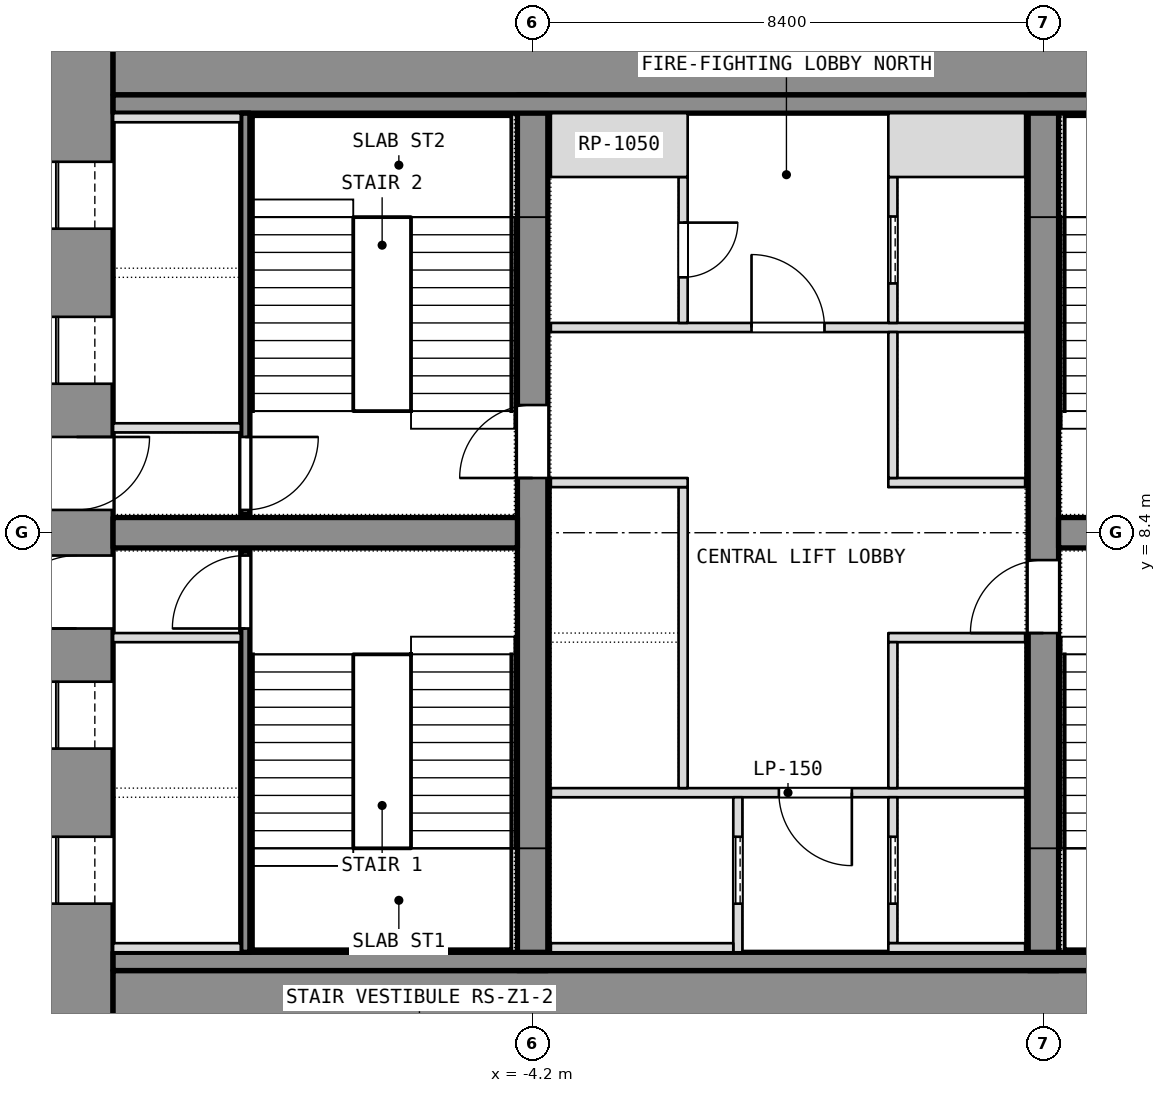
"""IFC4 building model, lengths in metres.
Left out: names, types, materials, properties, quantities, classifications, styles, units other than length and angle.
Written with IfcOpenShell. Run it as: python <this file> out.ifc"""

import sys

from ifc_helpers import new_model, si_unit, direction, frame, frame_2d, origin, place, context, subcontext, project, spatial, rectangle, extrude, element, fill, save


model = new_model("IFC4")
c1 = context("Model", 3, precision=1e-05, world=origin(), true_north=direction((0.0, 1.0)))
c2 = subcontext(c1, "Body", "Model", "MODEL_VIEW")
j1 = project(units=[si_unit("LENGTHUNIT", "METRE"), si_unit("PLANEANGLEUNIT", "RADIAN")], contexts=[c1])
p1 = place(None, origin())
s1 = spatial("IfcSite", under=j1, at=p1, CompositionType="ELEMENT")
p2 = place(p1, origin())
s2 = spatial("IfcBuilding", under=s1, at=p2, CompositionType="ELEMENT")
p3 = place(p2, frame((0.0, 0.0, 72.5)))
s3 = spatial("IfcBuildingStorey", under=s2, at=p3, CompositionType="ELEMENT", Elevation=72.5)
p4 = place(p3, frame((-11.7, 0.0, 0.0), z_axis=(0.0, 0.0, 1.0), x_axis=(0.0, 1.0, 0.0)))
e1 = element("IfcWall", 1, at=p4, inside=s3, PredefinedType="SHEAR", context=c2, shape_type="SweptSolid", body=[
    extrude(rectangle(XDim=16.8, YDim=1.2, at=frame_2d((8.4, 0.0))), origin(), (0.0, 0.0, 1.0), 3.6),
])
p5 = place(p4, frame((2.3, 0.0, 0.0)))
e2 = element("IfcOpeningElement", 2, at=p5, cuts=e1, PredefinedType="OPENING", context=c2, shape_type="SweptSolid", body=[
    extrude(rectangle(XDim=1.1, YDim=2.1, at=frame_2d((0.55, 1.05))), frame((0.0, 0.6, 0.0), z_axis=(0.0, -1.0, 0.0), x_axis=(1.0, 0.0, 0.0)), (0.0, 0.0, 1.0), 1.2),
])
p6 = place(p4, frame((4.85, 0.0, 0.0)))
e3 = element("IfcOpeningElement", 3, at=p6, cuts=e1, PredefinedType="OPENING", context=c2, shape_type="SweptSolid", body=[
    extrude(rectangle(XDim=1.1, YDim=2.1, at=frame_2d((0.55, 1.05))), frame((0.0, 0.6, 0.0), z_axis=(0.0, -1.0, 0.0), x_axis=(1.0, 0.0, 0.0)), (0.0, 0.0, 1.0), 1.2),
])
p7 = place(p4, frame((6.825, 0.0, 0.0)))
e4 = element("IfcOpeningElement", 4, at=p7, cuts=e1, PredefinedType="OPENING", context=c2, shape_type="SweptSolid", body=[
    extrude(rectangle(XDim=1.2, YDim=2.1, at=frame_2d((0.6, 1.05))), frame((0.0, 0.6, 0.0), z_axis=(0.0, -1.0, 0.0), x_axis=(1.0, 0.0, 0.0)), (0.0, 0.0, 1.0), 1.2),
])
p8 = place(p4, frame((13.4, 0.0, 0.0)))
e5 = element("IfcOpeningElement", 5, at=p8, cuts=e1, PredefinedType="OPENING", context=c2, shape_type="SweptSolid", body=[
    extrude(rectangle(XDim=1.1, YDim=2.1, at=frame_2d((0.55, 1.05))), frame((0.0, 0.6, 0.0), z_axis=(0.0, -1.0, 0.0), x_axis=(1.0, 0.0, 0.0)), (0.0, 0.0, 1.0), 1.2),
])
p9 = place(p4, frame((10.85, 0.0, 0.0)))
e6 = element("IfcOpeningElement", 6, at=p9, cuts=e1, PredefinedType="OPENING", context=c2, shape_type="SweptSolid", body=[
    extrude(rectangle(XDim=1.1, YDim=2.1, at=frame_2d((0.55, 1.05))), frame((0.0, 0.6, 0.0), z_axis=(0.0, -1.0, 0.0), x_axis=(1.0, 0.0, 0.0)), (0.0, 0.0, 1.0), 1.2),
])
p10 = place(p4, frame((8.775, 0.0, 0.0)))
e7 = element("IfcOpeningElement", 7, at=p10, cuts=e1, PredefinedType="OPENING", context=c2, shape_type="SweptSolid", body=[
    extrude(rectangle(XDim=1.2, YDim=2.1, at=frame_2d((0.6, 1.05))), frame((0.0, 0.6, 0.0), z_axis=(0.0, -1.0, 0.0), x_axis=(1.0, 0.0, 0.0)), (0.0, 0.0, 1.0), 1.2),
])
for number, where, z_axis, x_axis in (
    (8, (-11.1, 0.6, 0.0), (0.0, 0.0, 1.0), (1.0, 0.0, 0.0)),
    (9, (-11.1, 16.2, 0.0), (0.0, 0.0, 1.0), (1.0, 0.0, 0.0)),
):
    element("IfcWall", number, at=place(p3, frame(where, z_axis=z_axis, x_axis=x_axis)), inside=s3, PredefinedType="SHEAR", context=c2, shape_type="SweptSolid", body=[
        extrude(rectangle(XDim=22.2, YDim=1.2, at=frame_2d((11.1, 0.0))), origin(), (0.0, 0.0, 1.0), 3.6),
    ])
p11 = place(p3, frame((-4.2, 1.2, 0.0), z_axis=(0.0, 0.0, 1.0), x_axis=(0.0, 1.0, 0.0)))
e10 = element("IfcWall", 10, at=p11, inside=s3, PredefinedType="SHEAR", context=c2, shape_type="SweptSolid", body=[
    extrude(rectangle(XDim=14.4, YDim=0.5, at=frame_2d((7.2, 0.0))), origin(), (0.0, 0.0, 1.0), 3.6),
])
p12 = place(p11, frame((8.1, 0.0, 0.0)))
e11 = element("IfcOpeningElement", 11, at=p12, cuts=e10, PredefinedType="OPENING", context=c2, shape_type="SweptSolid", body=[
    extrude(rectangle(XDim=1.2, YDim=2.1, at=frame_2d((0.6, 1.05))), frame((0.0, 0.25, 0.0), z_axis=(0.0, -1.0, 0.0), x_axis=(1.0, 0.0, 0.0)), (0.0, 0.0, 1.0), 0.5),
])
p13 = place(p3, frame((4.2, 1.2, 0.0), z_axis=(0.0, 0.0, 1.0), x_axis=(0.0, 1.0, 0.0)))
e12 = element("IfcWall", 12, at=p13, inside=s3, PredefinedType="SHEAR", context=c2, shape_type="SweptSolid", body=[
    extrude(rectangle(XDim=14.4, YDim=0.5, at=frame_2d((7.2, 0.0))), origin(), (0.0, 0.0, 1.0), 3.6),
])
p14 = place(p13, frame((5.55, 0.0, 0.0)))
e13 = element("IfcOpeningElement", 13, at=p14, cuts=e12, PredefinedType="OPENING", context=c2, shape_type="SweptSolid", body=[
    extrude(rectangle(XDim=1.2, YDim=2.1, at=frame_2d((0.6, 1.05))), frame((0.0, 0.25, 0.0), z_axis=(0.0, -1.0, 0.0), x_axis=(1.0, 0.0, 0.0)), (0.0, 0.0, 1.0), 0.5),
])
for number, where, z_axis, x_axis in (
    (14, (-11.1, 8.4, 0.0), (0.0, 0.0, 1.0), (1.0, 0.0, 0.0)),
    (15, (4.45, 8.4, 0.0), (0.0, 0.0, 1.0), (1.0, 0.0, 0.0)),
):
    element("IfcWall", number, at=place(p3, frame(where, z_axis=z_axis, x_axis=x_axis)), inside=s3, PredefinedType="SHEAR", context=c2, shape_type="SweptSolid", body=[
        extrude(rectangle(XDim=6.65, YDim=0.5, at=frame_2d((3.325, 0.0))), origin(), (0.0, 0.0, 1.0), 3.6),
    ])
for number, where, z_axis, x_axis in (
    (16, (-11.1, 1.35, 0.0), (0.0, 0.0, 1.0), (1.0, 0.0, 0.0)),
    (17, (-11.1, 15.45, 0.0), (0.0, 0.0, 1.0), (1.0, 0.0, 0.0)),
):
    element("IfcWall", number, at=place(p3, frame(where, z_axis=z_axis, x_axis=x_axis)), inside=s3, PredefinedType="PARTITIONING", context=c2, shape_type="SweptSolid", body=[
        extrude(rectangle(XDim=22.2, YDim=0.3, at=frame_2d((11.1, 0.0))), origin(), (0.0, 0.0, 1.0), 3.34),
    ])
p15 = place(p3, frame((-8.925, 1.5, 0.0), z_axis=(0.0, 0.0, 1.0), x_axis=(0.0, 1.0, 0.0)))
e18 = element("IfcWall", 18, at=p15, inside=s3, PredefinedType="SHEAR", context=c2, shape_type="SweptSolid", body=[
    extrude(rectangle(XDim=6.6, YDim=0.15, at=frame_2d((3.3, 0.0))), origin(), (0.0, 0.0, 1.0), 3.34),
])
p16 = place(p15, frame((5.325, 0.0, 0.0)))
e19 = element("IfcOpeningElement", 19, at=p16, cuts=e18, PredefinedType="OPENING", context=c2, shape_type="SweptSolid", body=[
    extrude(rectangle(XDim=1.2, YDim=2.1, at=frame_2d((0.6, 1.05))), frame((0.0, 0.075, 0.0), z_axis=(0.0, -1.0, 0.0), x_axis=(1.0, 0.0, 0.0)), (0.0, 0.0, 1.0), 0.15),
])
for number, where, z_axis, x_axis in (
    (20, (-11.1, 6.675, 0.0), (0.0, 0.0, 1.0), (1.0, 0.0, 0.0)),
    (21, (-11.1, 1.575, 0.0), (0.0, 0.0, 1.0), (1.0, 0.0, 0.0)),
):
    element("IfcWall", number, at=place(p3, frame(where, z_axis=z_axis, x_axis=x_axis)), inside=s3, PredefinedType="SHEAR", context=c2, shape_type="SweptSolid", body=[
        extrude(rectangle(XDim=2.1, YDim=0.15, at=frame_2d((1.05, 0.0))), origin(), (0.0, 0.0, 1.0), 3.6),
    ])
p17 = place(p3, frame((-8.925, 8.7, 0.0), z_axis=(0.0, 0.0, 1.0), x_axis=(0.0, 1.0, 0.0)))
e22 = element("IfcWall", 22, at=p17, inside=s3, PredefinedType="SHEAR", context=c2, shape_type="SweptSolid", body=[
    extrude(rectangle(XDim=6.6, YDim=0.15, at=frame_2d((3.3, 0.0))), origin(), (0.0, 0.0, 1.0), 3.34),
])
p18 = place(p17, frame((0.075, 0.0, 0.0)))
e23 = element("IfcOpeningElement", 23, at=p18, cuts=e22, PredefinedType="OPENING", context=c2, shape_type="SweptSolid", body=[
    extrude(rectangle(XDim=1.2, YDim=2.1, at=frame_2d((0.6, 1.05))), frame((0.0, 0.075, 0.0), z_axis=(0.0, -1.0, 0.0), x_axis=(1.0, 0.0, 0.0)), (0.0, 0.0, 1.0), 0.15),
])
for number, where, z_axis, x_axis in (
    (24, (-11.1, 10.125, 0.0), (0.0, 0.0, 1.0), (1.0, 0.0, 0.0)),
    (25, (-11.1, 15.225, 0.0), (0.0, 0.0, 1.0), (1.0, 0.0, 0.0)),
):
    element("IfcWall", number, at=place(p3, frame(where, z_axis=z_axis, x_axis=x_axis)), inside=s3, PredefinedType="SHEAR", context=c2, shape_type="SweptSolid", body=[
        extrude(rectangle(XDim=2.1, YDim=0.15, at=frame_2d((1.05, 0.0))), origin(), (0.0, 0.0, 1.0), 3.6),
    ])
p19 = place(p3, frame((-3.9, 4.125, 0.0), z_axis=(0.0, 0.0, 1.0), x_axis=(1.0, 0.0, 0.0)))
e26 = element("IfcWall", 26, at=p19, inside=s3, PredefinedType="PARTITIONING", context=c2, shape_type="SweptSolid", body=[
    extrude(rectangle(XDim=7.8, YDim=0.15, at=frame_2d((3.9, 0.0))), origin(), (0.0, 0.0, 1.0), 3.34),
])
p20 = place(p19, frame((3.75, 0.0, 0.0)))
e27 = element("IfcOpeningElement", 27, at=p20, cuts=e26, PredefinedType="OPENING", context=c2, shape_type="SweptSolid", body=[
    extrude(rectangle(XDim=1.2, YDim=2.1, at=frame_2d((0.6, 1.05))), frame((0.0, 0.075, 0.0), z_axis=(0.0, -1.0, 0.0), x_axis=(1.0, 0.0, 0.0)), (0.0, 0.0, 1.0), 0.15),
])
p21 = place(p3, frame((-3.9, 11.775, 0.0), z_axis=(0.0, 0.0, 1.0), x_axis=(1.0, 0.0, 0.0)))
e28 = element("IfcWall", 28, at=p21, inside=s3, PredefinedType="PARTITIONING", context=c2, shape_type="SweptSolid", body=[
    extrude(rectangle(XDim=7.8, YDim=0.15, at=frame_2d((3.9, 0.0))), origin(), (0.0, 0.0, 1.0), 3.34),
])
p22 = place(p21, frame((3.3, 0.0, 0.0)))
e29 = element("IfcOpeningElement", 29, at=p22, cuts=e28, PredefinedType="OPENING", context=c2, shape_type="SweptSolid", body=[
    extrude(rectangle(XDim=1.2, YDim=2.1, at=frame_2d((0.6, 1.05))), frame((0.0, 0.075, 0.0), z_axis=(0.0, -1.0, 0.0), x_axis=(1.0, 0.0, 0.0)), (0.0, 0.0, 1.0), 0.15),
])
p23 = place(p3, frame((-0.825, 1.5, 0.0), z_axis=(0.0, 0.0, 1.0), x_axis=(0.0, 1.0, 0.0)))
e30 = element("IfcWall", 30, at=p23, inside=s3, PredefinedType="SHEAR", context=c2, shape_type="SweptSolid", body=[
    extrude(rectangle(XDim=2.55, YDim=0.15, at=frame_2d((1.275, 0.0))), origin(), (0.0, 0.0, 1.0), 3.6),
])
p24 = place(p23, frame((0.8, 0.0, 0.0)))
e31 = element("IfcOpeningElement", 31, at=p24, cuts=e30, PredefinedType="OPENING", context=c2, shape_type="SweptSolid", body=[
    extrude(rectangle(XDim=1.1, YDim=2.1, at=frame_2d((0.55, 1.05))), frame((0.0, 0.075, 0.0), z_axis=(0.0, -1.0, 0.0), x_axis=(1.0, 0.0, 0.0)), (0.0, 0.0, 1.0), 0.15),
])
p25 = place(p3, frame((-3.9, 1.575, 0.0), z_axis=(0.0, 0.0, 1.0), x_axis=(1.0, 0.0, 0.0)))
e32 = element("IfcWall", 32, at=p25, inside=s3, PredefinedType="SHEAR", context=c2, shape_type="SweptSolid", body=[
    extrude(rectangle(XDim=3.0, YDim=0.15, at=frame_2d((1.5, 0.0))), origin(), (0.0, 0.0, 1.0), 3.6),
])
p26 = place(p3, frame((-1.725, 4.2, 0.0), z_axis=(0.0, 0.0, 1.0), x_axis=(0.0, 1.0, 0.0)))
e33 = element("IfcWall", 33, at=p26, inside=s3, PredefinedType="SHEAR", context=c2, shape_type="SweptSolid", body=[
    extrude(rectangle(XDim=4.95, YDim=0.15, at=frame_2d((2.475, 0.0))), origin(), (0.0, 0.0, 1.0), 3.6),
])
p27 = place(p3, frame((-3.9, 9.225, 0.0), z_axis=(0.0, 0.0, 1.0), x_axis=(1.0, 0.0, 0.0)))
e34 = element("IfcWall", 34, at=p27, inside=s3, PredefinedType="SHEAR", context=c2, shape_type="SweptSolid", body=[
    extrude(rectangle(XDim=2.25, YDim=0.15, at=frame_2d((1.125, 0.0))), origin(), (0.0, 0.0, 1.0), 3.6),
])
p28 = place(p3, frame((-1.725, 11.85, 0.0), z_axis=(0.0, 0.0, 1.0), x_axis=(0.0, 1.0, 0.0)))
e35 = element("IfcWall", 35, at=p28, inside=s3, PredefinedType="PARTITIONING", context=c2, shape_type="SweptSolid", body=[
    extrude(rectangle(XDim=2.4, YDim=0.15, at=frame_2d((1.2, 0.0))), origin(), (0.0, 0.0, 1.0), 3.34),
])
p29 = place(p28, frame((0.75, 0.0, 0.0)))
e36 = element("IfcOpeningElement", 36, at=p29, cuts=e35, PredefinedType="OPENING", context=c2, shape_type="SweptSolid", body=[
    extrude(rectangle(XDim=0.9, YDim=2.1, at=frame_2d((0.45, 1.05))), frame((0.0, 0.075, 0.0), z_axis=(0.0, -1.0, 0.0), x_axis=(1.0, 0.0, 0.0)), (0.0, 0.0, 1.0), 0.15),
])
p30 = place(p3, frame((-3.9, 14.775, 0.0), z_axis=(0.0, 0.0, 1.0), x_axis=(1.0, 0.0, 0.0)))
e37 = element("IfcWall", 37, at=p30, inside=s3, PredefinedType="PARTITIONING", context=c2, shape_type="SweptSolid", body=[
    extrude(rectangle(XDim=2.25, YDim=1.05, at=frame_2d((1.125, 0.0))), origin(), (0.0, 0.0, 1.0), 3.34),
])
p31 = place(p3, frame((1.725, 1.65, 0.0), z_axis=(0.0, 0.0, 1.0), x_axis=(0.0, 1.0, 0.0)))
e38 = element("IfcWall", 38, at=p31, inside=s3, PredefinedType="SHEAR", context=c2, shape_type="SweptSolid", body=[
    extrude(rectangle(XDim=2.4, YDim=0.15, at=frame_2d((1.2, 0.0))), origin(), (0.0, 0.0, 1.0), 3.6),
])
p32 = place(p31, frame((0.65, 0.0, 0.0)))
e39 = element("IfcOpeningElement", 39, at=p32, cuts=e38, PredefinedType="OPENING", context=c2, shape_type="SweptSolid", body=[
    extrude(rectangle(XDim=1.1, YDim=2.1, at=frame_2d((0.55, 1.05))), frame((0.0, 0.075, 0.0), z_axis=(0.0, -1.0, 0.0), x_axis=(1.0, 0.0, 0.0)), (0.0, 0.0, 1.0), 0.15),
])
p33 = place(p3, frame((1.65, 1.575, 0.0), z_axis=(0.0, 0.0, 1.0), x_axis=(1.0, 0.0, 0.0)))
e40 = element("IfcWall", 40, at=p33, inside=s3, PredefinedType="SHEAR", context=c2, shape_type="SweptSolid", body=[
    extrude(rectangle(XDim=2.25, YDim=0.15, at=frame_2d((1.125, 0.0))), origin(), (0.0, 0.0, 1.0), 3.6),
])
p34 = place(p3, frame((1.725, 11.85, 0.0), z_axis=(0.0, 0.0, 1.0), x_axis=(0.0, 1.0, 0.0)))
e41 = element("IfcWall", 41, at=p34, inside=s3, PredefinedType="SHEAR", context=c2, shape_type="SweptSolid", body=[
    extrude(rectangle(XDim=2.4, YDim=0.15, at=frame_2d((1.2, 0.0))), origin(), (0.0, 0.0, 1.0), 3.6),
])
p35 = place(p34, frame((0.65, 0.0, 0.0)))
e42 = element("IfcOpeningElement", 42, at=p35, cuts=e41, PredefinedType="OPENING", context=c2, shape_type="SweptSolid", body=[
    extrude(rectangle(XDim=1.1, YDim=2.1, at=frame_2d((0.55, 1.05))), frame((0.0, 0.075, 0.0), z_axis=(0.0, -1.0, 0.0), x_axis=(1.0, 0.0, 0.0)), (0.0, 0.0, 1.0), 0.15),
])
p36 = place(p3, frame((1.65, 14.775, 0.0), z_axis=(0.0, 0.0, 1.0), x_axis=(1.0, 0.0, 0.0)))
e43 = element("IfcWall", 43, at=p36, inside=s3, PredefinedType="SHEAR", context=c2, shape_type="SweptSolid", body=[
    extrude(rectangle(XDim=2.25, YDim=1.05, at=frame_2d((1.125, 0.0))), origin(), (0.0, 0.0, 1.0), 3.6),
])
for number, where, z_axis, x_axis in (
    (44, (1.65, 6.675, 0.0), (0.0, 0.0, 1.0), (1.0, 0.0, 0.0)),
    (45, (1.65, 9.225, 0.0), (0.0, 0.0, 1.0), (1.0, 0.0, 0.0)),
):
    element("IfcWall", number, at=place(p3, frame(where, z_axis=z_axis, x_axis=x_axis)), inside=s3, PredefinedType="SHEAR", context=c2, shape_type="SweptSolid", body=[
        extrude(rectangle(XDim=2.25, YDim=0.15, at=frame_2d((1.125, 0.0))), origin(), (0.0, 0.0, 1.0), 3.6),
    ])
p37 = place(p3, frame((1.725, 4.2, 0.0), z_axis=(0.0, 0.0, 1.0), x_axis=(0.0, 1.0, 0.0)))
e46 = element("IfcWall", 46, at=p37, inside=s3, PredefinedType="SHEAR", context=c2, shape_type="SweptSolid", body=[
    extrude(rectangle(XDim=2.4, YDim=0.15, at=frame_2d((1.2, 0.0))), origin(), (0.0, 0.0, 1.0), 3.6),
])
p38 = place(p3, frame((1.725, 9.3, 0.0), z_axis=(0.0, 0.0, 1.0), x_axis=(0.0, 1.0, 0.0)))
e47 = element("IfcWall", 47, at=p38, inside=s3, PredefinedType="SHEAR", context=c2, shape_type="SweptSolid", body=[
    extrude(rectangle(XDim=2.4, YDim=0.15, at=frame_2d((1.2, 0.0))), origin(), (0.0, 0.0, 1.0), 3.6),
])
p39 = place(p5, origin())
e48 = element("IfcDoor", 48, at=p39, inside=s3, OperationType="SLIDING_TO_LEFT", PredefinedType="DOOR", context=c2, shape_type="SweptSolid", body=[
    extrude(rectangle(XDim=1.1, YDim=2.1, at=frame_2d((0.55, 1.05))), frame((0.0, 0.025, 0.0), z_axis=(0.0, -1.0, 0.0), x_axis=(1.0, 0.0, 0.0)), (0.0, 0.0, 1.0), 0.05),
])
fill(e2, e48)
p40 = place(p6, origin())
e49 = element("IfcDoor", 49, at=p40, inside=s3, OperationType="SLIDING_TO_LEFT", PredefinedType="DOOR", context=c2, shape_type="SweptSolid", body=[
    extrude(rectangle(XDim=1.1, YDim=2.1, at=frame_2d((0.55, 1.05))), frame((0.0, 0.025, 0.0), z_axis=(0.0, -1.0, 0.0), x_axis=(1.0, 0.0, 0.0)), (0.0, 0.0, 1.0), 0.05),
])
fill(e3, e49)
p41 = place(p7, origin())
e50 = element("IfcDoor", 50, at=p41, inside=s3, OperationType="SINGLE_SWING_LEFT", PredefinedType="DOOR", context=c2, shape_type="SweptSolid", body=[
    extrude(rectangle(XDim=1.2, YDim=2.1, at=frame_2d((0.6, 1.05))), frame((0.0, 0.025, 0.0), z_axis=(0.0, -1.0, 0.0), x_axis=(1.0, 0.0, 0.0)), (0.0, 0.0, 1.0), 0.05),
])
fill(e4, e50)
p42 = place(p16, origin())
e51 = element("IfcDoor", 51, at=p42, inside=s3, OperationType="SINGLE_SWING_LEFT", PredefinedType="DOOR", context=c2, shape_type="SweptSolid", body=[
    extrude(rectangle(XDim=1.2, YDim=2.1, at=frame_2d((0.6, 1.05))), frame((0.0, 0.025, 0.0), z_axis=(0.0, -1.0, 0.0), x_axis=(1.0, 0.0, 0.0)), (0.0, 0.0, 1.0), 0.05),
])
fill(e19, e51)
p43 = place(p8, origin())
e52 = element("IfcDoor", 52, at=p43, inside=s3, OperationType="SLIDING_TO_LEFT", PredefinedType="DOOR", context=c2, shape_type="SweptSolid", body=[
    extrude(rectangle(XDim=1.1, YDim=2.1, at=frame_2d((0.55, 1.05))), frame((0.0, 0.025, 0.0), z_axis=(0.0, -1.0, 0.0), x_axis=(1.0, 0.0, 0.0)), (0.0, 0.0, 1.0), 0.05),
])
fill(e5, e52)
p44 = place(p9, origin())
e53 = element("IfcDoor", 53, at=p44, inside=s3, OperationType="SLIDING_TO_LEFT", PredefinedType="DOOR", context=c2, shape_type="SweptSolid", body=[
    extrude(rectangle(XDim=1.1, YDim=2.1, at=frame_2d((0.55, 1.05))), frame((0.0, 0.025, 0.0), z_axis=(0.0, -1.0, 0.0), x_axis=(1.0, 0.0, 0.0)), (0.0, 0.0, 1.0), 0.05),
])
fill(e6, e53)
p45 = place(p10, origin())
e54 = element("IfcDoor", 54, at=p45, inside=s3, OperationType="SINGLE_SWING_LEFT", PredefinedType="DOOR", context=c2, shape_type="SweptSolid", body=[
    extrude(rectangle(XDim=1.2, YDim=2.1, at=frame_2d((0.6, 1.05))), frame((0.0, 0.025, 0.0), z_axis=(0.0, -1.0, 0.0), x_axis=(1.0, 0.0, 0.0)), (0.0, 0.0, 1.0), 0.05),
])
fill(e7, e54)
p46 = place(p18, origin())
e55 = element("IfcDoor", 55, at=p46, inside=s3, OperationType="SINGLE_SWING_LEFT", PredefinedType="DOOR", context=c2, shape_type="SweptSolid", body=[
    extrude(rectangle(XDim=1.2, YDim=2.1, at=frame_2d((0.6, 1.05))), frame((0.0, 0.025, 0.0), z_axis=(0.0, -1.0, 0.0), x_axis=(1.0, 0.0, 0.0)), (0.0, 0.0, 1.0), 0.05),
])
fill(e23, e55)
p47 = place(p24, origin())
e56 = element("IfcDoor", 56, at=p47, inside=s3, OperationType="SLIDING_TO_LEFT", PredefinedType="DOOR", context=c2, shape_type="SweptSolid", body=[
    extrude(rectangle(XDim=1.1, YDim=2.1, at=frame_2d((0.55, 1.05))), frame((0.0, 0.025, 0.0), z_axis=(0.0, -1.0, 0.0), x_axis=(1.0, 0.0, 0.0)), (0.0, 0.0, 1.0), 0.05),
])
fill(e31, e56)
p48 = place(p32, origin())
e57 = element("IfcDoor", 57, at=p48, inside=s3, OperationType="SLIDING_TO_LEFT", PredefinedType="DOOR", context=c2, shape_type="SweptSolid", body=[
    extrude(rectangle(XDim=1.1, YDim=2.1, at=frame_2d((0.55, 1.05))), frame((0.0, 0.025, 0.0), z_axis=(0.0, -1.0, 0.0), x_axis=(1.0, 0.0, 0.0)), (0.0, 0.0, 1.0), 0.05),
])
fill(e39, e57)
p49 = place(p35, origin())
e58 = element("IfcDoor", 58, at=p49, inside=s3, OperationType="SLIDING_TO_LEFT", PredefinedType="DOOR", context=c2, shape_type="SweptSolid", body=[
    extrude(rectangle(XDim=1.1, YDim=2.1, at=frame_2d((0.55, 1.05))), frame((0.0, 0.025, 0.0), z_axis=(0.0, -1.0, 0.0), x_axis=(1.0, 0.0, 0.0)), (0.0, 0.0, 1.0), 0.05),
])
fill(e42, e58)
p50 = place(p20, origin())
e59 = element("IfcDoor", 59, at=p50, inside=s3, OperationType="SINGLE_SWING_LEFT", PredefinedType="DOOR", context=c2, shape_type="SweptSolid", body=[
    extrude(rectangle(XDim=1.2, YDim=2.1, at=frame_2d((0.6, 1.05))), frame((0.0, 0.025, 0.0), z_axis=(0.0, -1.0, 0.0), x_axis=(1.0, 0.0, 0.0)), (0.0, 0.0, 1.0), 0.05),
])
fill(e27, e59)
p51 = place(p22, origin())
e60 = element("IfcDoor", 60, at=p51, inside=s3, OperationType="SINGLE_SWING_LEFT", PredefinedType="DOOR", context=c2, shape_type="SweptSolid", body=[
    extrude(rectangle(XDim=1.2, YDim=2.1, at=frame_2d((0.6, 1.05))), frame((0.0, 0.025, 0.0), z_axis=(0.0, -1.0, 0.0), x_axis=(1.0, 0.0, 0.0)), (0.0, 0.0, 1.0), 0.05),
])
fill(e29, e60)
p52 = place(p29, origin())
e61 = element("IfcDoor", 61, at=p52, inside=s3, OperationType="SINGLE_SWING_LEFT", PredefinedType="DOOR", context=c2, shape_type="SweptSolid", body=[
    extrude(rectangle(XDim=0.9, YDim=2.1, at=frame_2d((0.45, 1.05))), frame((0.0, 0.025, 0.0), z_axis=(0.0, -1.0, 0.0), x_axis=(1.0, 0.0, 0.0)), (0.0, 0.0, 1.0), 0.05),
])
fill(e36, e61)
p53 = place(p12, origin())
e62 = element("IfcDoor", 62, at=p53, inside=s3, OperationType="SINGLE_SWING_LEFT", PredefinedType="DOOR", context=c2, shape_type="SweptSolid", body=[
    extrude(rectangle(XDim=1.2, YDim=2.1, at=frame_2d((0.6, 1.05))), frame((0.0, 0.025, 0.0), z_axis=(0.0, -1.0, 0.0), x_axis=(1.0, 0.0, 0.0)), (0.0, 0.0, 1.0), 0.05),
])
fill(e11, e62)
p54 = place(p14, origin())
e63 = element("IfcDoor", 63, at=p54, inside=s3, OperationType="SINGLE_SWING_LEFT", PredefinedType="DOOR", context=c2, shape_type="SweptSolid", body=[
    extrude(rectangle(XDim=1.2, YDim=2.1, at=frame_2d((0.6, 1.05))), frame((0.0, 0.025, 0.0), z_axis=(0.0, -1.0, 0.0), x_axis=(1.0, 0.0, 0.0)), (0.0, 0.0, 1.0), 0.05),
])
fill(e13, e63)
save(model, sys.argv[1])
